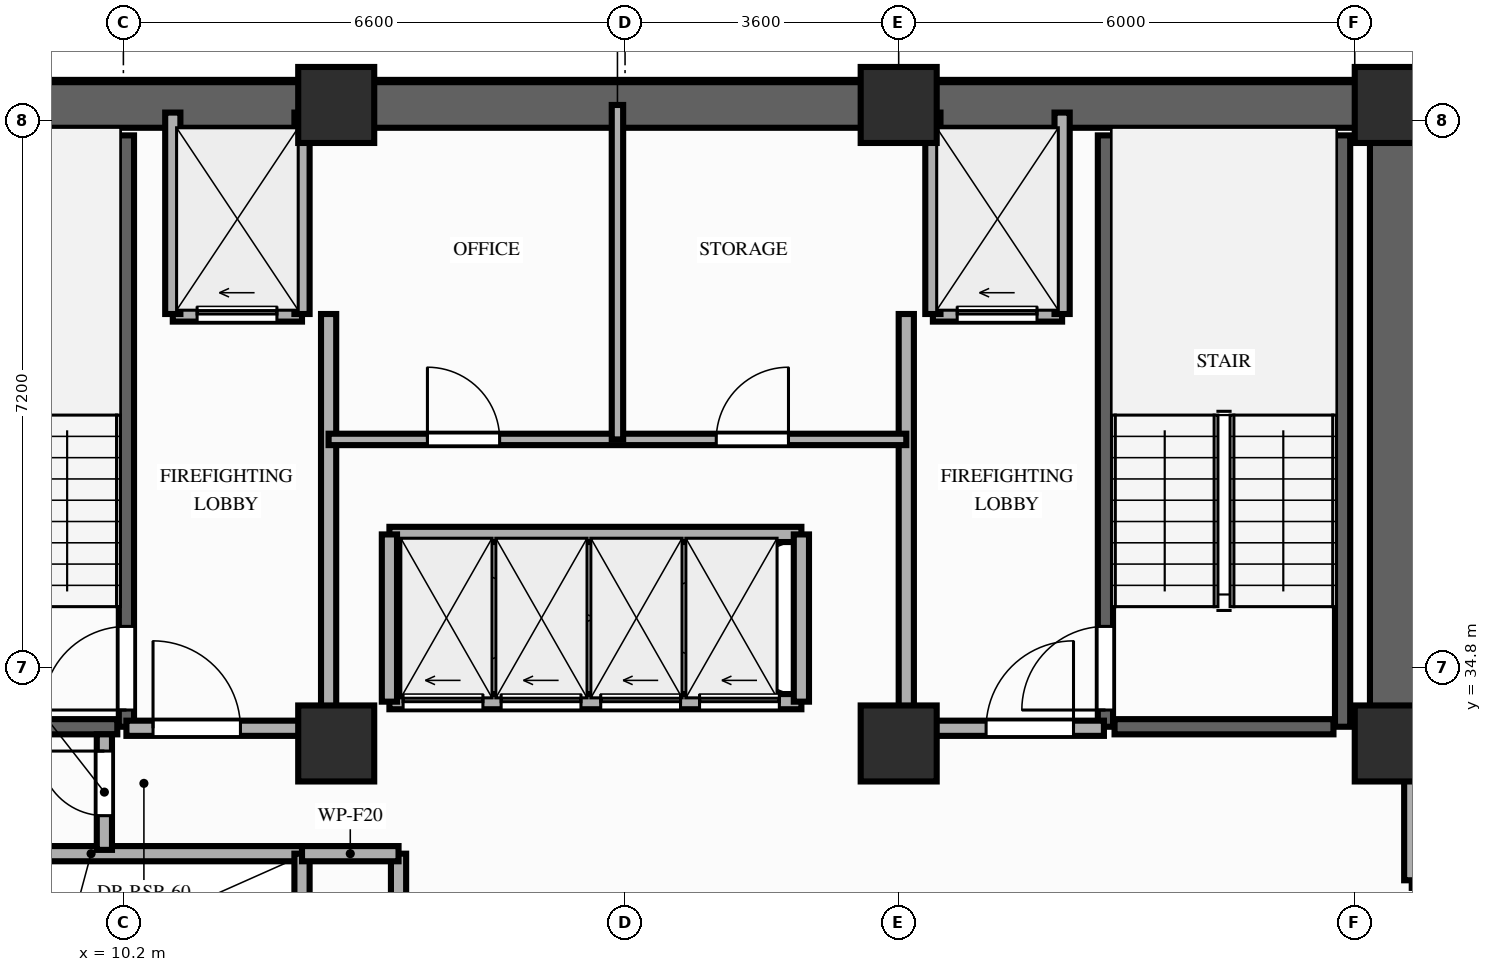
"""IFC4 building model, lengths in metres.
Left out: names, types, materials, properties, quantities, classifications, styles, units other than length and angle.
Written with IfcOpenShell. Run it as: python <this file> out.ifc"""

import sys

from ifc_helpers import new_model, si_unit, direction, frame, frame_2d, origin, origin_2d, place, context, subcontext, project, spatial, rectangle, extrude, element, fill, save


model = new_model("IFC4")
c1 = context("Model", 3, precision=1e-05, world=origin(), true_north=direction((0.0, 1.0)))
c2 = subcontext(c1, "Body", "Model", "MODEL_VIEW")
j1 = project(units=[si_unit("LENGTHUNIT", "METRE"), si_unit("PLANEANGLEUNIT", "RADIAN")], contexts=[c1])
p1 = place(None, origin())
s1 = spatial("IfcSite", under=j1, at=p1, CompositionType="ELEMENT")
p2 = place(p1, origin())
s2 = spatial("IfcBuilding", under=s1, at=p2, CompositionType="ELEMENT")
p3 = place(p2, frame((0.0, 0.0, 129.8)))
s3 = spatial("IfcBuildingStorey", under=s2, at=p3, CompositionType="ELEMENT", Elevation=129.8)
for number, where, z_axis, x_axis in (
    (1, (13.0, 33.8, 0.0), (0.0, 0.0, 1.0), (1.0, 0.0, 0.0)),
    (2, (20.4, 33.8, 0.0), (0.0, 0.0, 1.0), (1.0, 0.0, 0.0)),
    (3, (26.9, 33.8, 0.0), (0.0, 0.0, 1.0), (1.0, 0.0, 0.0)),
    (4, (13.0, 42.2, 0.0), (0.0, 0.0, 1.0), (1.0, 0.0, 0.0)),
    (5, (20.4, 42.2, 0.0), (0.0, 0.0, 1.0), (1.0, 0.0, 0.0)),
    (6, (26.9, 42.2, 0.0), (0.0, 0.0, 1.0), (1.0, 0.0, 0.0)),
):
    element("IfcColumn", number, at=place(p3, frame(where, z_axis=z_axis, x_axis=x_axis)), inside=s3, PredefinedType="COLUMN", context=c2, shape_type="SweptSolid", body=[
        extrude(rectangle(XDim=1.0, YDim=1.0, at=origin_2d()), origin(), (0.0, 0.0, 1.0), 3.2),
    ])
p4 = place(p3, frame((6.45, 42.2, 0.0), z_axis=(0.0, 0.0, 1.0), x_axis=(1.0, 0.0, 0.0)))
e7 = element("IfcWall", 7, at=p4, inside=s3, PredefinedType="SHEAR", context=c2, shape_type="SweptSolid", body=[
    extrude(rectangle(XDim=20.45, YDim=0.6, at=frame_2d((10.225, 0.0))), origin(), (0.0, 0.0, 1.0), 3.02),
])
p5 = place(p3, frame((26.9, 33.8, 0.0), z_axis=(0.0, 0.0, 1.0), x_axis=(0.0, 1.0, 0.0)))
e8 = element("IfcWall", 8, at=p5, inside=s3, PredefinedType="SHEAR", context=c2, shape_type="SweptSolid", body=[
    extrude(rectangle(XDim=7.95, YDim=0.6, at=frame_2d((3.975, 0.0))), origin(), (0.0, 0.0, 1.0), 3.02),
])
p6 = place(p3, frame((10.24, 34.02, 0.0), z_axis=(0.0, 0.0, 1.0), x_axis=(0.0, 1.0, 0.0)))
e9 = element("IfcWall", 9, at=p6, inside=s3, PredefinedType="SHEAR", context=c2, shape_type="SweptSolid", body=[
    extrude(rectangle(XDim=7.78, YDim=0.2, at=frame_2d((3.89, 0.0))), origin(), (0.0, 0.0, 1.0), 3.02),
])
p7 = place(p6, frame((0.22, 0.0, 0.0)))
e10 = element("IfcOpeningElement", 10, at=p7, cuts=e9, PredefinedType="OPENING", context=c2, shape_type="SweptSolid", body=[
    extrude(rectangle(XDim=1.1, YDim=2.15, at=frame_2d((0.55, 1.075))), frame((0.0, 0.11, 0.0), z_axis=(0.0, -1.0, 0.0), x_axis=(1.0, 0.0, 0.0)), (0.0, 0.0, 1.0), 0.22),
])
p8 = place(p3, frame((7.24, 34.02, 0.0), z_axis=(0.0, 0.0, 1.0), x_axis=(1.0, 0.0, 0.0)))
e11 = element("IfcWall", 11, at=p8, inside=s3, PredefinedType="SHEAR", context=c2, shape_type="SweptSolid", body=[
    extrude(rectangle(XDim=2.88, YDim=0.2, at=frame_2d((1.44, 0.0))), origin(), (0.0, 0.0, 1.0), 3.02),
])
p9 = place(p3, frame((23.12, 34.02, 0.0), z_axis=(0.0, 0.0, 1.0), x_axis=(0.0, 1.0, 0.0)))
e12 = element("IfcWall", 12, at=p9, inside=s3, PredefinedType="SHEAR", context=c2, shape_type="SweptSolid", body=[
    extrude(rectangle(XDim=7.78, YDim=0.2, at=frame_2d((3.89, 0.0))), origin(), (0.0, 0.0, 1.0), 3.02),
])
p10 = place(p9, frame((0.22, 0.0, 0.0)))
e13 = element("IfcOpeningElement", 13, at=p10, cuts=e12, PredefinedType="OPENING", context=c2, shape_type="SweptSolid", body=[
    extrude(rectangle(XDim=1.1, YDim=2.15, at=frame_2d((0.55, 1.075))), frame((0.0, 0.11, 0.0), z_axis=(0.0, -1.0, 0.0), x_axis=(1.0, 0.0, 0.0)), (0.0, 0.0, 1.0), 0.22),
])
p11 = place(p3, frame((26.24, 34.02, 0.0), z_axis=(0.0, 0.0, 1.0), x_axis=(0.0, 1.0, 0.0)))
e14 = element("IfcWall", 14, at=p11, inside=s3, PredefinedType="SHEAR", context=c2, shape_type="SweptSolid", body=[
    extrude(rectangle(XDim=7.78, YDim=0.2, at=frame_2d((3.89, 0.0))), origin(), (0.0, 0.0, 1.0), 3.02),
])
p12 = place(p3, frame((23.24, 34.02, 0.0), z_axis=(0.0, 0.0, 1.0), x_axis=(1.0, 0.0, 0.0)))
e15 = element("IfcWall", 15, at=p12, inside=s3, PredefinedType="SHEAR", context=c2, shape_type="SweptSolid", body=[
    extrude(rectangle(XDim=2.88, YDim=0.2, at=frame_2d((1.44, 0.0))), origin(), (0.0, 0.0, 1.0), 3.02),
])
p13 = place(p3, frame((7.0, 32.35, 0.0), z_axis=(0.0, 0.0, 1.0), x_axis=(1.0, 0.0, 0.0)))
e16 = element("IfcWall", 16, at=p13, inside=s3, PredefinedType="MOVABLE", context=c2, shape_type="SweptSolid", body=[
    extrude(rectangle(XDim=5.55, YDim=0.2, at=frame_2d((2.775, 0.0))), origin(), (0.0, 0.0, 1.0), 3.02),
])
p14 = place(p3, frame((12.55, 29.85, 0.0), z_axis=(0.0, 0.0, 1.0), x_axis=(0.0, 1.0, 0.0)))
e17 = element("IfcWall", 17, at=p14, inside=s3, PredefinedType="MOVABLE", context=c2, shape_type="SweptSolid", body=[
    extrude(rectangle(XDim=2.5, YDim=0.2, at=frame_2d((1.25, 0.0))), origin(), (0.0, 0.0, 1.0), 3.02),
])
p15 = place(p3, frame((10.85, 39.45, 0.0), z_axis=(0.0, 0.0, 1.0), x_axis=(1.0, 0.0, 0.0)))
e18 = element("IfcWall", 18, at=p15, inside=s3, PredefinedType="MOVABLE", context=c2, shape_type="SweptSolid", body=[
    extrude(rectangle(XDim=1.7, YDim=0.2, at=frame_2d((0.85, 0.0))), origin(), (0.0, 0.0, 1.0), 3.02),
])
p16 = place(p15, frame((0.32, 0.0, 0.0)))
e19 = element("IfcOpeningElement", 19, at=p16, cuts=e18, PredefinedType="OPENING", context=c2, shape_type="SweptSolid", body=[
    extrude(rectangle(XDim=1.05, YDim=2.15, at=frame_2d((0.525, 1.075))), frame((0.0, 0.11, 0.0), z_axis=(0.0, -1.0, 0.0), x_axis=(1.0, 0.0, 0.0)), (0.0, 0.0, 1.0), 0.22),
])
p17 = place(p3, frame((20.85, 39.45, 0.0), z_axis=(0.0, 0.0, 1.0), x_axis=(1.0, 0.0, 0.0)))
e20 = element("IfcWall", 20, at=p17, inside=s3, PredefinedType="MOVABLE", context=c2, shape_type="SweptSolid", body=[
    extrude(rectangle(XDim=1.7, YDim=0.2, at=frame_2d((0.85, 0.0))), origin(), (0.0, 0.0, 1.0), 3.02),
])
p18 = place(p17, frame((0.32, 0.0, 0.0)))
e21 = element("IfcOpeningElement", 21, at=p18, cuts=e20, PredefinedType="OPENING", context=c2, shape_type="SweptSolid", body=[
    extrude(rectangle(XDim=1.05, YDim=2.15, at=frame_2d((0.525, 1.075))), frame((0.0, 0.11, 0.0), z_axis=(0.0, -1.0, 0.0), x_axis=(1.0, 0.0, 0.0)), (0.0, 0.0, 1.0), 0.22),
])
for number, where, z_axis, x_axis in (
    (22, (10.85, 39.45, 0.0), (0.0, 0.0, 1.0), (0.0, 1.0, 0.0)),
    (23, (12.55, 39.45, 0.0), (0.0, 0.0, 1.0), (0.0, 1.0, 0.0)),
):
    element("IfcWall", number, at=place(p3, frame(where, z_axis=z_axis, x_axis=x_axis)), inside=s3, PredefinedType="MOVABLE", context=c2, shape_type="SweptSolid", body=[
        extrude(rectangle(XDim=2.65, YDim=0.2, at=frame_2d((1.325, 0.0))), origin(), (0.0, 0.0, 1.0), 2.45),
    ])
p19 = place(p3, frame((12.9, 34.0, 0.0), z_axis=(0.0, 0.0, 1.0), x_axis=(0.0, 1.0, 0.0)))
e24 = element("IfcWall", 24, at=p19, inside=s3, PredefinedType="PARTITIONING", context=c2, shape_type="SweptSolid", body=[
    extrude(rectangle(XDim=5.45, YDim=0.2, at=frame_2d((2.725, 0.0))), origin(), (0.0, 0.0, 1.0), 2.45),
])
p20 = place(p3, frame((10.24, 34.0, 0.0), z_axis=(0.0, 0.0, 1.0), x_axis=(1.0, 0.0, 0.0)))
e25 = element("IfcWall", 25, at=p20, inside=s3, PredefinedType="PARTITIONING", context=c2, shape_type="SweptSolid", body=[
    extrude(rectangle(XDim=2.66, YDim=0.2, at=frame_2d((1.33, 0.0))), origin(), (0.0, 0.0, 1.0), 2.45),
])
p21 = place(p20, frame((0.35, 0.0, 0.0)))
e26 = element("IfcOpeningElement", 26, at=p21, cuts=e25, PredefinedType="OPENING", context=c2, shape_type="SweptSolid", body=[
    extrude(rectangle(XDim=1.15, YDim=2.15, at=frame_2d((0.575, 1.075))), frame((0.0, 0.11, 0.0), z_axis=(0.0, -1.0, 0.0), x_axis=(1.0, 0.0, 0.0)), (0.0, 0.0, 1.0), 0.22),
])
for number, where, z_axis, x_axis in (
    (27, (20.85, 39.45, 0.0), (0.0, 0.0, 1.0), (0.0, 1.0, 0.0)),
    (28, (22.55, 39.45, 0.0), (0.0, 0.0, 1.0), (0.0, 1.0, 0.0)),
):
    element("IfcWall", number, at=place(p3, frame(where, z_axis=z_axis, x_axis=x_axis)), inside=s3, PredefinedType="MOVABLE", context=c2, shape_type="SweptSolid", body=[
        extrude(rectangle(XDim=2.65, YDim=0.2, at=frame_2d((1.325, 0.0))), origin(), (0.0, 0.0, 1.0), 2.45),
    ])
p22 = place(p3, frame((20.5, 34.0, 0.0), z_axis=(0.0, 0.0, 1.0), x_axis=(0.0, 1.0, 0.0)))
e29 = element("IfcWall", 29, at=p22, inside=s3, PredefinedType="PARTITIONING", context=c2, shape_type="SweptSolid", body=[
    extrude(rectangle(XDim=5.45, YDim=0.2, at=frame_2d((2.725, 0.0))), origin(), (0.0, 0.0, 1.0), 2.45),
])
p23 = place(p3, frame((20.5, 34.0, 0.0), z_axis=(0.0, 0.0, 1.0), x_axis=(1.0, 0.0, 0.0)))
e30 = element("IfcWall", 30, at=p23, inside=s3, PredefinedType="PARTITIONING", context=c2, shape_type="SweptSolid", body=[
    extrude(rectangle(XDim=2.6, YDim=0.2, at=frame_2d((1.3, 0.0))), origin(), (0.0, 0.0, 1.0), 2.45),
])
p24 = place(p23, frame((1.05, 0.0, 0.0)))
e31 = element("IfcOpeningElement", 31, at=p24, cuts=e30, PredefinedType="OPENING", context=c2, shape_type="SweptSolid", body=[
    extrude(rectangle(XDim=1.15, YDim=2.15, at=frame_2d((0.575, 1.075))), frame((0.0, 0.11, 0.0), z_axis=(0.0, -1.0, 0.0), x_axis=(1.0, 0.0, 0.0)), (0.0, 0.0, 1.0), 0.22),
])
p25 = place(p3, frame((13.82, 29.85, 0.0), z_axis=(0.0, 0.0, 1.0), x_axis=(0.0, 1.0, 0.0)))
e32 = element("IfcWall", 32, at=p25, inside=s3, PredefinedType="PARTITIONING", context=c2, shape_type="SweptSolid", body=[
    extrude(rectangle(XDim=2.5, YDim=0.2, at=frame_2d((1.25, 0.0))), origin(), (0.0, 0.0, 1.0), 3.02),
])
p26 = place(p3, frame((12.55, 32.35, 0.0), z_axis=(0.0, 0.0, 1.0), x_axis=(1.0, 0.0, 0.0)))
e33 = element("IfcWall", 33, at=p26, inside=s3, PredefinedType="PARTITIONING", context=c2, shape_type="SweptSolid", body=[
    extrude(rectangle(XDim=1.27, YDim=0.2, at=frame_2d((0.635, 0.0))), origin(), (0.0, 0.0, 1.0), 3.02),
])
p27 = place(p3, frame((9.95, 32.4, 0.0), z_axis=(0.0, 0.0, 1.0), x_axis=(0.0, 1.0, 0.0)))
e34 = element("IfcWall", 34, at=p27, inside=s3, PredefinedType="PARTITIONING", context=c2, shape_type="SweptSolid", body=[
    extrude(rectangle(XDim=1.52, YDim=0.2, at=frame_2d((0.76, 0.0))), origin(), (0.0, 0.0, 1.0), 2.45),
])
p28 = place(p27, frame((0.45, 0.0, 0.0)))
e35 = element("IfcOpeningElement", 35, at=p28, cuts=e34, PredefinedType="OPENING", context=c2, shape_type="SweptSolid", body=[
    extrude(rectangle(XDim=0.85, YDim=2.05, at=frame_2d((0.425, 1.025))), frame((0.0, 0.11, 0.0), z_axis=(0.0, -1.0, 0.0), x_axis=(1.0, 0.0, 0.0)), (0.0, 0.0, 1.0), 0.22),
])
p29 = place(p3, frame((12.9, 37.8, 0.0), z_axis=(0.0, 0.0, 1.0), x_axis=(1.0, 0.0, 0.0)))
e36 = element("IfcWall", 36, at=p29, inside=s3, PredefinedType="PARTITIONING", context=c2, shape_type="SweptSolid", body=[
    extrude(rectangle(XDim=7.6, YDim=0.15, at=frame_2d((3.8, 0.0))), origin(), (0.0, 0.0, 1.0), 3.02),
])
p30 = place(p29, frame((1.3, 0.0, 0.0)))
e37 = element("IfcOpeningElement", 37, at=p30, cuts=e36, PredefinedType="OPENING", context=c2, shape_type="SweptSolid", body=[
    extrude(rectangle(XDim=0.95, YDim=2.15, at=frame_2d((0.475, 1.075))), frame((0.0, 0.085, 0.0), z_axis=(0.0, -1.0, 0.0), x_axis=(1.0, 0.0, 0.0)), (0.0, 0.0, 1.0), 0.17),
])
p31 = place(p29, frame((5.1, 0.0, 0.0)))
e38 = element("IfcOpeningElement", 38, at=p31, cuts=e36, PredefinedType="OPENING", context=c2, shape_type="SweptSolid", body=[
    extrude(rectangle(XDim=0.95, YDim=2.15, at=frame_2d((0.475, 1.075))), frame((0.0, 0.085, 0.0), z_axis=(0.0, -1.0, 0.0), x_axis=(1.0, 0.0, 0.0)), (0.0, 0.0, 1.0), 0.17),
])
p32 = place(p3, frame((16.7, 37.8, 0.0), z_axis=(0.0, 0.0, 1.0), x_axis=(0.0, 1.0, 0.0)))
e39 = element("IfcWall", 39, at=p32, inside=s3, PredefinedType="PARTITIONING", context=c2, shape_type="SweptSolid", body=[
    extrude(rectangle(XDim=4.4, YDim=0.15, at=frame_2d((2.2, 0.0))), origin(), (0.0, 0.0, 1.0), 2.45),
])
p33 = place(p3, frame((13.7, 34.35, 0.0), z_axis=(0.0, 0.0, 1.0), x_axis=(1.0, 0.0, 0.0)))
e40 = element("IfcWall", 40, at=p33, inside=s3, PredefinedType="MOVABLE", context=c2, shape_type="SweptSolid", body=[
    extrude(rectangle(XDim=5.42, YDim=0.2, at=frame_2d((2.71, 0.0))), origin(), (0.0, 0.0, 1.0), 3.02),
])
p34 = place(p33, frame((0.18, 0.0, 0.0)))
e41 = element("IfcOpeningElement", 41, at=p34, cuts=e40, PredefinedType="OPENING", context=c2, shape_type="SweptSolid", body=[
    extrude(rectangle(XDim=1.05, YDim=2.15, at=frame_2d((0.525, 1.075))), frame((0.0, 0.11, 0.0), z_axis=(0.0, -1.0, 0.0), x_axis=(1.0, 0.0, 0.0)), (0.0, 0.0, 1.0), 0.22),
])
p35 = place(p33, frame((1.47, 0.0, 0.0)))
e42 = element("IfcOpeningElement", 42, at=p35, cuts=e40, PredefinedType="OPENING", context=c2, shape_type="SweptSolid", body=[
    extrude(rectangle(XDim=1.05, YDim=2.15, at=frame_2d((0.525, 1.075))), frame((0.0, 0.11, 0.0), z_axis=(0.0, -1.0, 0.0), x_axis=(1.0, 0.0, 0.0)), (0.0, 0.0, 1.0), 0.22),
])
p36 = place(p33, frame((2.78, 0.0, 0.0)))
e43 = element("IfcOpeningElement", 43, at=p36, cuts=e40, PredefinedType="OPENING", context=c2, shape_type="SweptSolid", body=[
    extrude(rectangle(XDim=1.05, YDim=2.15, at=frame_2d((0.525, 1.075))), frame((0.0, 0.11, 0.0), z_axis=(0.0, -1.0, 0.0), x_axis=(1.0, 0.0, 0.0)), (0.0, 0.0, 1.0), 0.22),
])
p37 = place(p33, frame((4.08, 0.0, 0.0)))
e44 = element("IfcOpeningElement", 44, at=p37, cuts=e40, PredefinedType="OPENING", context=c2, shape_type="SweptSolid", body=[
    extrude(rectangle(XDim=1.05, YDim=2.15, at=frame_2d((0.525, 1.075))), frame((0.0, 0.11, 0.0), z_axis=(0.0, -1.0, 0.0), x_axis=(1.0, 0.0, 0.0)), (0.0, 0.0, 1.0), 0.22),
])
p38 = place(p3, frame((13.7, 36.55, 0.0), z_axis=(0.0, 0.0, 1.0), x_axis=(1.0, 0.0, 0.0)))
e45 = element("IfcWall", 45, at=p38, inside=s3, PredefinedType="MOVABLE", context=c2, shape_type="SweptSolid", body=[
    extrude(rectangle(XDim=5.42, YDim=0.2, at=frame_2d((2.71, 0.0))), origin(), (0.0, 0.0, 1.0), 3.02),
])
for number, where, z_axis, x_axis in (
    (46, (13.7, 34.35, 0.0), (0.0, 0.0, 1.0), (0.0, 1.0, 0.0)),
    (47, (19.12, 34.35, 0.0), (0.0, 0.0, 1.0), (0.0, 1.0, 0.0)),
):
    element("IfcWall", number, at=place(p3, frame(where, z_axis=z_axis, x_axis=x_axis)), inside=s3, PredefinedType="MOVABLE", context=c2, shape_type="SweptSolid", body=[
        extrude(rectangle(XDim=2.2, YDim=0.2, at=frame_2d((1.1, 0.0))), origin(), (0.0, 0.0, 1.0), 3.02),
    ])
p39 = place(p3, frame((27.15, 32.0, 0.0), z_axis=(0.0, 0.0, 1.0), x_axis=(1.0, 0.0, 0.0)))
e48 = element("IfcWall", 48, at=p39, inside=s3, PredefinedType="PARTITIONING", context=c2, shape_type="SweptSolid", body=[
    extrude(rectangle(XDim=13.15, YDim=0.2, at=frame_2d((6.575, 0.0))), origin(), (0.0, 0.0, 1.0), 2.45),
])
p40 = place(p39, frame((1.96, 0.0, 0.0)))
e49 = element("IfcOpeningElement", 49, at=p40, cuts=e48, PredefinedType="OPENING", context=c2, shape_type="SweptSolid", body=[
    extrude(rectangle(XDim=0.95, YDim=2.15, at=frame_2d((0.475, 1.075))), frame((0.0, 0.11, 0.0), z_axis=(0.0, -1.0, 0.0), x_axis=(1.0, 0.0, 0.0)), (0.0, 0.0, 1.0), 0.22),
])
p41 = place(p39, frame((8.53, 0.0, 0.0)))
e50 = element("IfcOpeningElement", 50, at=p41, cuts=e48, PredefinedType="OPENING", context=c2, shape_type="SweptSolid", body=[
    extrude(rectangle(XDim=0.95, YDim=2.15, at=frame_2d((0.475, 1.075))), frame((0.0, 0.11, 0.0), z_axis=(0.0, -1.0, 0.0), x_axis=(1.0, 0.0, 0.0)), (0.0, 0.0, 1.0), 0.22),
])
p42 = place(p3, frame((27.15, 32.0, 0.0), z_axis=(0.0, 0.0, 1.0), x_axis=(0.0, 1.0, 0.0)))
e51 = element("IfcWall", 51, at=p42, inside=s3, PredefinedType="PARTITIONING", context=c2, shape_type="SweptSolid", body=[
    extrude(rectangle(XDim=1.68, YDim=0.2, at=frame_2d((0.84, 0.0))), origin(), (0.0, 0.0, 1.0), 2.45),
])
p43 = place(p7, origin())
e52 = element("IfcDoor", 52, at=p43, inside=s3, OperationType="SINGLE_SWING_LEFT", PredefinedType="DOOR", context=c2, shape_type="SweptSolid", body=[
    extrude(rectangle(XDim=1.1, YDim=2.15, at=frame_2d((0.55, 1.075))), frame((0.0, 0.025, 0.0), z_axis=(0.0, -1.0, 0.0), x_axis=(1.0, 0.0, 0.0)), (0.0, 0.0, 1.0), 0.05),
])
fill(e10, e52)
p44 = place(p10, origin())
e53 = element("IfcDoor", 53, at=p44, inside=s3, OperationType="SINGLE_SWING_LEFT", PredefinedType="DOOR", context=c2, shape_type="SweptSolid", body=[
    extrude(rectangle(XDim=1.1, YDim=2.15, at=frame_2d((0.55, 1.075))), frame((0.0, 0.025, 0.0), z_axis=(0.0, -1.0, 0.0), x_axis=(1.0, 0.0, 0.0)), (0.0, 0.0, 1.0), 0.05),
])
fill(e13, e53)
p45 = place(p16, origin())
e54 = element("IfcDoor", 54, at=p45, inside=s3, OperationType="SLIDING_TO_LEFT", PredefinedType="DOOR", context=c2, shape_type="SweptSolid", body=[
    extrude(rectangle(XDim=1.05, YDim=2.15, at=frame_2d((0.525, 1.075))), frame((0.0, 0.025, 0.0), z_axis=(0.0, -1.0, 0.0), x_axis=(1.0, 0.0, 0.0)), (0.0, 0.0, 1.0), 0.05),
])
fill(e19, e54)
p46 = place(p18, origin())
e55 = element("IfcDoor", 55, at=p46, inside=s3, OperationType="SLIDING_TO_LEFT", PredefinedType="DOOR", context=c2, shape_type="SweptSolid", body=[
    extrude(rectangle(XDim=1.05, YDim=2.15, at=frame_2d((0.525, 1.075))), frame((0.0, 0.025, 0.0), z_axis=(0.0, -1.0, 0.0), x_axis=(1.0, 0.0, 0.0)), (0.0, 0.0, 1.0), 0.05),
])
fill(e21, e55)
p47 = place(p21, origin())
e56 = element("IfcDoor", 56, at=p47, inside=s3, OperationType="SINGLE_SWING_LEFT", PredefinedType="DOOR", context=c2, shape_type="SweptSolid", body=[
    extrude(rectangle(XDim=1.15, YDim=2.15, at=frame_2d((0.575, 1.075))), frame((0.0, 0.025, 0.0), z_axis=(0.0, -1.0, 0.0), x_axis=(1.0, 0.0, 0.0)), (0.0, 0.0, 1.0), 0.05),
])
fill(e26, e56)
p48 = place(p24, origin())
e57 = element("IfcDoor", 57, at=p48, inside=s3, OperationType="SINGLE_SWING_RIGHT", PredefinedType="DOOR", context=c2, shape_type="SweptSolid", body=[
    extrude(rectangle(XDim=1.15, YDim=2.15, at=frame_2d((0.575, 1.075))), frame((0.0, 0.025, 0.0), z_axis=(0.0, -1.0, 0.0), x_axis=(1.0, 0.0, 0.0)), (0.0, 0.0, 1.0), 0.05),
])
fill(e31, e57)
p49 = place(p28, origin())
e58 = element("IfcDoor", 58, at=p49, inside=s3, OperationType="SINGLE_SWING_RIGHT", PredefinedType="DOOR", context=c2, shape_type="SweptSolid", body=[
    extrude(rectangle(XDim=0.85, YDim=2.05, at=frame_2d((0.425, 1.025))), frame((0.0, 0.025, 0.0), z_axis=(0.0, -1.0, 0.0), x_axis=(1.0, 0.0, 0.0)), (0.0, 0.0, 1.0), 0.05),
])
fill(e35, e58)
p50 = place(p30, origin())
e59 = element("IfcDoor", 59, at=p50, inside=s3, OperationType="SINGLE_SWING_LEFT", PredefinedType="DOOR", context=c2, shape_type="SweptSolid", body=[
    extrude(rectangle(XDim=0.95, YDim=2.15, at=frame_2d((0.475, 1.075))), frame((0.0, 0.025, 0.0), z_axis=(0.0, -1.0, 0.0), x_axis=(1.0, 0.0, 0.0)), (0.0, 0.0, 1.0), 0.05),
])
fill(e37, e59)
p51 = place(p31, origin())
e60 = element("IfcDoor", 60, at=p51, inside=s3, OperationType="SINGLE_SWING_RIGHT", PredefinedType="DOOR", context=c2, shape_type="SweptSolid", body=[
    extrude(rectangle(XDim=0.95, YDim=2.15, at=frame_2d((0.475, 1.075))), frame((0.0, 0.025, 0.0), z_axis=(0.0, -1.0, 0.0), x_axis=(1.0, 0.0, 0.0)), (0.0, 0.0, 1.0), 0.05),
])
fill(e38, e60)
p52 = place(p34, origin())
e61 = element("IfcDoor", 61, at=p52, inside=s3, OperationType="SLIDING_TO_LEFT", PredefinedType="DOOR", context=c2, shape_type="SweptSolid", body=[
    extrude(rectangle(XDim=1.05, YDim=2.15, at=frame_2d((0.525, 1.075))), frame((0.0, 0.025, 0.0), z_axis=(0.0, -1.0, 0.0), x_axis=(1.0, 0.0, 0.0)), (0.0, 0.0, 1.0), 0.05),
])
fill(e41, e61)
p53 = place(p35, origin())
e62 = element("IfcDoor", 62, at=p53, inside=s3, OperationType="SLIDING_TO_LEFT", PredefinedType="DOOR", context=c2, shape_type="SweptSolid", body=[
    extrude(rectangle(XDim=1.05, YDim=2.15, at=frame_2d((0.525, 1.075))), frame((0.0, 0.025, 0.0), z_axis=(0.0, -1.0, 0.0), x_axis=(1.0, 0.0, 0.0)), (0.0, 0.0, 1.0), 0.05),
])
fill(e42, e62)
p54 = place(p36, origin())
e63 = element("IfcDoor", 63, at=p54, inside=s3, OperationType="SLIDING_TO_LEFT", PredefinedType="DOOR", context=c2, shape_type="SweptSolid", body=[
    extrude(rectangle(XDim=1.05, YDim=2.15, at=frame_2d((0.525, 1.075))), frame((0.0, 0.025, 0.0), z_axis=(0.0, -1.0, 0.0), x_axis=(1.0, 0.0, 0.0)), (0.0, 0.0, 1.0), 0.05),
])
fill(e43, e63)
p55 = place(p37, origin())
e64 = element("IfcDoor", 64, at=p55, inside=s3, OperationType="SLIDING_TO_LEFT", PredefinedType="DOOR", context=c2, shape_type="SweptSolid", body=[
    extrude(rectangle(XDim=1.05, YDim=2.15, at=frame_2d((0.525, 1.075))), frame((0.0, 0.025, 0.0), z_axis=(0.0, -1.0, 0.0), x_axis=(1.0, 0.0, 0.0)), (0.0, 0.0, 1.0), 0.05),
])
fill(e44, e64)
save(model, sys.argv[1])
